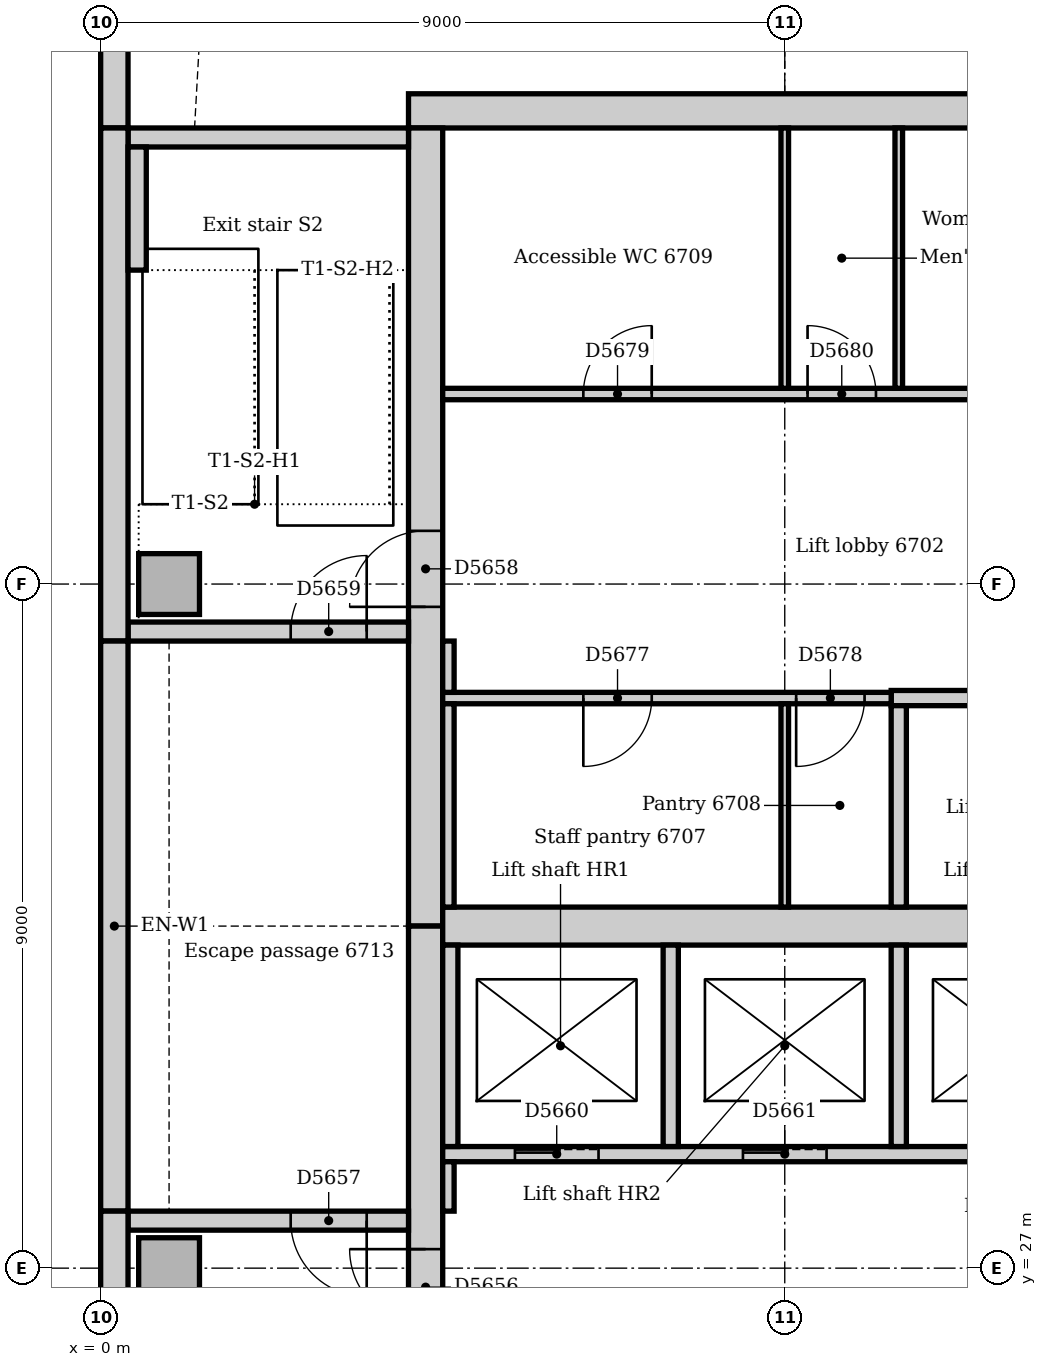
"""IFC4 building model, lengths in metres.
Left out: names, types, materials, properties, quantities, classifications, styles, units other than length and angle.
Written with IfcOpenShell. Run it as: python <this file> out.ifc"""

import sys

from ifc_helpers import new_model, si_unit, direction, frame, frame_2d, origin, origin_2d, place, context, subcontext, project, spatial, rectangle, extrude, element, fill, save


model = new_model("IFC4")
c1 = context("Model", 3, precision=1e-05, world=origin(), true_north=direction((0.0, 1.0)))
c2 = subcontext(c1, "Body", "Model", "MODEL_VIEW")
j1 = project(units=[si_unit("LENGTHUNIT", "METRE"), si_unit("PLANEANGLEUNIT", "RADIAN")], contexts=[c1])
p1 = place(None, origin())
s1 = spatial("IfcSite", under=j1, at=p1, CompositionType="ELEMENT")
p2 = place(p1, origin())
s2 = spatial("IfcBuilding", under=s1, at=p2, CompositionType="ELEMENT")
p3 = place(p2, frame((0.0, 0.0, 279.0)))
s3 = spatial("IfcBuildingStorey", under=s2, at=p3, CompositionType="ELEMENT", Elevation=279.0)
p4 = place(p3, frame((22.95, 42.225, 0.0), z_axis=(0.0, 0.0, 1.0), x_axis=(-1.0, 0.0, 0.0)))
e1 = element("IfcWall", 1, at=p4, inside=s3, PredefinedType="SOLIDWALL", context=c2, shape_type="SweptSolid", body=[
    extrude(rectangle(XDim=18.9, YDim=0.45, at=frame_2d((9.45, 0.0))), origin(), (0.0, 0.0, 1.0), 4.0),
])
p5 = place(p3, frame((4.275, 42.0, 0.0), z_axis=(0.0, 0.0, 1.0), x_axis=(0.0, -1.0, 0.0)))
e2 = element("IfcWall", 2, at=p5, inside=s3, PredefinedType="SOLIDWALL", context=c2, shape_type="SweptSolid", body=[
    extrude(rectangle(XDim=10.5, YDim=0.45, at=frame_2d((5.25, 0.0))), origin(), (0.0, 0.0, 1.0), 4.0),
])
p6 = place(p5, frame((5.3, 0.0, 0.0)))
e3 = element("IfcOpeningElement", 3, at=p6, cuts=e2, PredefinedType="OPENING", context=c2, shape_type="SweptSolid", body=[
    extrude(rectangle(XDim=1.0, YDim=2.1, at=frame_2d((0.5, 1.05))), frame((0.0, 0.235, 0.0), z_axis=(0.0, -1.0, 0.0), x_axis=(1.0, 0.0, 0.0)), (0.0, 0.0, 1.0), 0.47),
])
p7 = place(p3, frame((4.275, 31.5, 0.0), z_axis=(0.0, 0.0, 1.0), x_axis=(0.0, -1.0, 0.0)))
e4 = element("IfcWall", 4, at=p7, inside=s3, PredefinedType="SOLIDWALL", context=c2, shape_type="SweptSolid", body=[
    extrude(rectangle(XDim=10.5, YDim=0.45, at=frame_2d((5.25, 0.0))), origin(), (0.0, 0.0, 1.0), 4.0),
])
p8 = place(p7, frame((4.25, 0.0, 0.0)))
e5 = element("IfcOpeningElement", 5, at=p8, cuts=e4, PredefinedType="OPENING", context=c2, shape_type="SweptSolid", body=[
    extrude(rectangle(XDim=1.0, YDim=2.1, at=frame_2d((0.5, 1.05))), frame((0.0, 0.235, 0.0), z_axis=(0.0, -1.0, 0.0), x_axis=(1.0, 0.0, 0.0)), (0.0, 0.0, 1.0), 0.47),
])
p9 = place(p3, frame((4.5, 31.5, 0.0), z_axis=(0.0, 0.0, 1.0), x_axis=(1.0, 0.0, 0.0)))
e6 = element("IfcWall", 6, at=p9, inside=s3, PredefinedType="SOLIDWALL", context=c2, shape_type="SweptSolid", body=[
    extrude(rectangle(XDim=18.0, YDim=0.5, at=frame_2d((9.0, 0.0))), origin(), (0.0, 0.0, 1.0), 4.0),
])
p10 = place(p3, frame((4.05, 27.625, 0.0), z_axis=(0.0, 0.0, 1.0), x_axis=(-1.0, 0.0, 0.0)))
e7 = element("IfcWall", 7, at=p10, inside=s3, PredefinedType="SOLIDWALL", context=c2, shape_type="SweptSolid", body=[
    extrude(rectangle(XDim=3.69, YDim=0.25, at=frame_2d((1.845, 0.0))), origin(), (0.0, 0.0, 1.0), 4.0),
])
p11 = place(p10, frame((0.55, 0.0, 0.0)))
e8 = element("IfcOpeningElement", 8, at=p11, cuts=e7, PredefinedType="OPENING", context=c2, shape_type="SweptSolid", body=[
    extrude(rectangle(XDim=1.0, YDim=2.1, at=frame_2d((0.5, 1.05))), frame((0.0, 0.135, 0.0), z_axis=(0.0, -1.0, 0.0), x_axis=(1.0, 0.0, 0.0)), (0.0, 0.0, 1.0), 0.27),
])
p12 = place(p3, frame((0.36, 35.375, 0.0), z_axis=(0.0, 0.0, 1.0), x_axis=(1.0, 0.0, 0.0)))
e9 = element("IfcWall", 9, at=p12, inside=s3, PredefinedType="SOLIDWALL", context=c2, shape_type="SweptSolid", body=[
    extrude(rectangle(XDim=3.69, YDim=0.25, at=frame_2d((1.845, 0.0))), origin(), (0.0, 0.0, 1.0), 4.0),
])
p13 = place(p12, frame((2.14, 0.0, 0.0)))
e10 = element("IfcOpeningElement", 10, at=p13, cuts=e9, PredefinedType="OPENING", context=c2, shape_type="SweptSolid", body=[
    extrude(rectangle(XDim=1.0, YDim=2.1, at=frame_2d((0.5, 1.05))), frame((0.0, 0.135, 0.0), z_axis=(0.0, -1.0, 0.0), x_axis=(1.0, 0.0, 0.0)), (0.0, 0.0, 1.0), 0.27),
])
p14 = place(p3, frame((4.05, 41.875, 0.0), z_axis=(0.0, 0.0, 1.0), x_axis=(-1.0, 0.0, 0.0)))
e11 = element("IfcWall", 11, at=p14, inside=s3, PredefinedType="SOLIDWALL", context=c2, shape_type="SweptSolid", body=[
    extrude(rectangle(XDim=3.69, YDim=0.25, at=frame_2d((1.845, 0.0))), origin(), (0.0, 0.0, 1.0), 4.0),
])
for number, where, z_axis, x_axis in (
    (12, (0.9, 27.0, 0.0), (0.0, 0.0, 1.0), (1.0, 0.0, 0.0)),
    (13, (0.9, 36.0, 0.0), (0.0, 0.0, 1.0), (1.0, 0.0, 0.0)),
):
    element("IfcColumn", number, at=place(p3, frame(where, z_axis=z_axis, x_axis=x_axis)), inside=s3, PredefinedType="COLUMN", context=c2, shape_type="SweptSolid", body=[
        extrude(rectangle(XDim=0.8, YDim=0.8, at=origin_2d()), origin(), (0.0, 0.0, 1.0), 4.0),
    ])
p15 = place(p3, frame((0.18, 58.757, 0.0), z_axis=(0.0, 0.0, 1.0), x_axis=(0.0, -1.0, 0.0)))
e14 = element("IfcWall", 14, at=p15, inside=s3, PredefinedType="STANDARD", context=c2, shape_type="SweptSolid", body=[
    extrude(rectangle(XDim=16.757, YDim=0.36, at=frame_2d((8.379, 0.0))), origin(), (0.0, 0.0, 1.0), 3.8),
])
p16 = place(p15, frame((3.107, 0.0, 0.9)))
e15 = element("IfcOpeningElement", 15, at=p16, cuts=e14, PredefinedType="OPENING", context=c2, shape_type="SweptSolid", body=[
    extrude(rectangle(XDim=3.3, YDim=1.6, at=frame_2d((1.65, 0.8))), frame((0.0, 0.19, 0.0), z_axis=(0.0, -1.0, 0.0), x_axis=(1.0, 0.0, 0.0)), (0.0, 0.0, 1.0), 0.38),
])
p17 = place(p15, frame((7.607, 0.0, 0.9)))
e16 = element("IfcOpeningElement", 16, at=p17, cuts=e14, PredefinedType="OPENING", context=c2, shape_type="SweptSolid", body=[
    extrude(rectangle(XDim=3.3, YDim=1.6, at=frame_2d((1.65, 0.8))), frame((0.0, 0.19, 0.0), z_axis=(0.0, -1.0, 0.0), x_axis=(1.0, 0.0, 0.0)), (0.0, 0.0, 1.0), 0.38),
])
p18 = place(p15, frame((12.107, 0.0, 0.9)))
e17 = element("IfcOpeningElement", 17, at=p18, cuts=e14, PredefinedType="OPENING", context=c2, shape_type="SweptSolid", body=[
    extrude(rectangle(XDim=3.3, YDim=1.6, at=frame_2d((1.65, 0.8))), frame((0.0, 0.19, 0.0), z_axis=(0.0, -1.0, 0.0), x_axis=(1.0, 0.0, 0.0)), (0.0, 0.0, 1.0), 0.38),
])
p19 = place(p3, frame((0.18, 42.0, 0.0), z_axis=(0.0, 0.0, 1.0), x_axis=(0.0, -1.0, 0.0)))
e18 = element("IfcWall", 18, at=p19, inside=s3, PredefinedType="STANDARD", context=c2, shape_type="SweptSolid", body=[
    extrude(rectangle(XDim=6.75, YDim=0.36, at=frame_2d((3.375, 0.0))), origin(), (0.0, 0.0, 1.0), 3.8),
])
p20 = place(p3, frame((0.18, 35.25, 0.0), z_axis=(0.0, 0.0, 1.0), x_axis=(0.0, -1.0, 0.0)))
e19 = element("IfcWall", 19, at=p20, inside=s3, PredefinedType="STANDARD", context=c2, shape_type="SweptSolid", body=[
    extrude(rectangle(XDim=7.5, YDim=0.36, at=frame_2d((3.75, 0.0))), origin(), (0.0, 0.0, 1.0), 3.8),
])
p21 = place(p3, frame((0.18, 27.75, 0.0), z_axis=(0.0, 0.0, 1.0), x_axis=(0.0, -1.0, 0.0)))
e20 = element("IfcWall", 20, at=p21, inside=s3, PredefinedType="STANDARD", context=c2, shape_type="SweptSolid", body=[
    extrude(rectangle(XDim=5.507, YDim=0.36, at=frame_2d((2.754, 0.0))), origin(), (0.0, 0.0, 1.0), 3.8),
])
p22 = place(p3, frame((0.48, 40.13, 0.0), z_axis=(0.0, 0.0, 1.0), x_axis=(0.0, 1.0, 0.0)))
e21 = element("IfcWall", 21, at=p22, inside=s3, PredefinedType="STANDARD", context=c2, shape_type="SweptSolid", body=[
    extrude(rectangle(XDim=1.62, YDim=0.24, at=frame_2d((0.81, 0.0))), origin(), (0.0, 0.0, 1.0), 4.0),
])
p23 = place(p3, frame((4.5, 28.5, 0.0), z_axis=(0.0, 0.0, 1.0), x_axis=(1.0, 0.0, 0.0)))
e22 = element("IfcWall", 22, at=p23, inside=s3, PredefinedType="PARTITIONING", context=c2, shape_type="SweptSolid", body=[
    extrude(rectangle(XDim=18.0, YDim=0.2, at=frame_2d((9.0, 0.0))), origin(), (0.0, 0.0, 1.0), 3.8),
])
p24 = place(p23, frame((0.95, 0.0, 0.0)))
e23 = element("IfcOpeningElement", 23, at=p24, cuts=e22, PredefinedType="OPENING", context=c2, shape_type="SweptSolid", body=[
    extrude(rectangle(XDim=1.1, YDim=2.1, at=frame_2d((0.55, 1.05))), frame((0.0, 0.11, 0.0), z_axis=(0.0, -1.0, 0.0), x_axis=(1.0, 0.0, 0.0)), (0.0, 0.0, 1.0), 0.22),
])
p25 = place(p23, frame((3.95, 0.0, 0.0)))
e24 = element("IfcOpeningElement", 24, at=p25, cuts=e22, PredefinedType="OPENING", context=c2, shape_type="SweptSolid", body=[
    extrude(rectangle(XDim=1.1, YDim=2.1, at=frame_2d((0.55, 1.05))), frame((0.0, 0.11, 0.0), z_axis=(0.0, -1.0, 0.0), x_axis=(1.0, 0.0, 0.0)), (0.0, 0.0, 1.0), 0.22),
])
p26 = place(p23, frame((6.95, 0.0, 0.0)))
e25 = element("IfcOpeningElement", 25, at=p26, cuts=e22, PredefinedType="OPENING", context=c2, shape_type="SweptSolid", body=[
    extrude(rectangle(XDim=1.1, YDim=2.1, at=frame_2d((0.55, 1.05))), frame((0.0, 0.11, 0.0), z_axis=(0.0, -1.0, 0.0), x_axis=(1.0, 0.0, 0.0)), (0.0, 0.0, 1.0), 0.22),
])
p27 = place(p23, frame((9.95, 0.0, 0.0)))
e26 = element("IfcOpeningElement", 26, at=p27, cuts=e22, PredefinedType="OPENING", context=c2, shape_type="SweptSolid", body=[
    extrude(rectangle(XDim=1.1, YDim=2.1, at=frame_2d((0.55, 1.05))), frame((0.0, 0.11, 0.0), z_axis=(0.0, -1.0, 0.0), x_axis=(1.0, 0.0, 0.0)), (0.0, 0.0, 1.0), 0.22),
])
p28 = place(p23, frame((12.95, 0.0, 0.0)))
e27 = element("IfcOpeningElement", 27, at=p28, cuts=e22, PredefinedType="OPENING", context=c2, shape_type="SweptSolid", body=[
    extrude(rectangle(XDim=1.1, YDim=2.1, at=frame_2d((0.55, 1.05))), frame((0.0, 0.11, 0.0), z_axis=(0.0, -1.0, 0.0), x_axis=(1.0, 0.0, 0.0)), (0.0, 0.0, 1.0), 0.22),
])
p29 = place(p23, frame((15.95, 0.0, 0.0)))
e28 = element("IfcOpeningElement", 28, at=p29, cuts=e22, PredefinedType="OPENING", context=c2, shape_type="SweptSolid", body=[
    extrude(rectangle(XDim=1.1, YDim=2.1, at=frame_2d((0.55, 1.05))), frame((0.0, 0.11, 0.0), z_axis=(0.0, -1.0, 0.0), x_axis=(1.0, 0.0, 0.0)), (0.0, 0.0, 1.0), 0.22),
])
p30 = place(p3, frame((10.4, 34.5, 0.0), z_axis=(0.0, 0.0, 1.0), x_axis=(1.0, 0.0, 0.0)))
e29 = element("IfcWall", 29, at=p30, inside=s3, PredefinedType="PARTITIONING", context=c2, shape_type="SweptSolid", body=[
    extrude(rectangle(XDim=12.1, YDim=0.2, at=frame_2d((6.05, 0.0))), origin(), (0.0, 0.0, 1.0), 3.8),
])
p31 = place(p30, frame((7.05, 0.0, 0.0)))
e30 = element("IfcOpeningElement", 30, at=p31, cuts=e29, PredefinedType="OPENING", context=c2, shape_type="SweptSolid", body=[
    extrude(rectangle(XDim=1.1, YDim=2.1, at=frame_2d((0.55, 1.05))), frame((0.0, 0.11, 0.0), z_axis=(0.0, -1.0, 0.0), x_axis=(1.0, 0.0, 0.0)), (0.0, 0.0, 1.0), 0.22),
])
p32 = place(p30, frame((10.05, 0.0, 0.0)))
e31 = element("IfcOpeningElement", 31, at=p32, cuts=e29, PredefinedType="OPENING", context=c2, shape_type="SweptSolid", body=[
    extrude(rectangle(XDim=1.1, YDim=2.1, at=frame_2d((0.55, 1.05))), frame((0.0, 0.11, 0.0), z_axis=(0.0, -1.0, 0.0), x_axis=(1.0, 0.0, 0.0)), (0.0, 0.0, 1.0), 0.22),
])
for number, where, z_axis, x_axis in (
    (32, (10.5, 28.6, 0.0), (0.0, 0.0, 1.0), (0.0, 1.0, 0.0)),
    (33, (10.5, 31.75, 0.0), (0.0, 0.0, 1.0), (0.0, 1.0, 0.0)),
    (34, (4.6, 28.6, 0.0), (0.0, 0.0, 1.0), (0.0, 1.0, 0.0)),
    (35, (7.5, 28.6, 0.0), (0.0, 0.0, 1.0), (0.0, 1.0, 0.0)),
):
    element("IfcWall", number, at=place(p3, frame(where, z_axis=z_axis, x_axis=x_axis)), inside=s3, PredefinedType="PARTITIONING", context=c2, shape_type="SweptSolid", body=[
        extrude(rectangle(XDim=2.65, YDim=0.2, at=frame_2d((1.325, 0.0))), origin(), (0.0, 0.0, 1.0), 3.8),
    ])
p33 = place(p3, frame((4.5, 38.5, 0.0), z_axis=(0.0, 0.0, 1.0), x_axis=(1.0, 0.0, 0.0)))
e36 = element("IfcWall", 36, at=p33, inside=s3, PredefinedType="PARTITIONING", context=c2, shape_type="SweptSolid", body=[
    extrude(rectangle(XDim=11.9, YDim=0.15, at=frame_2d((5.95, 0.0))), origin(), (0.0, 0.0, 1.0), 3.8),
])
p34 = place(p33, frame((1.85, 0.0, 0.0)))
e37 = element("IfcOpeningElement", 37, at=p34, cuts=e36, PredefinedType="OPENING", context=c2, shape_type="SweptSolid", body=[
    extrude(rectangle(XDim=0.9, YDim=2.1, at=frame_2d((0.45, 1.05))), frame((0.0, 0.085, 0.0), z_axis=(0.0, -1.0, 0.0), x_axis=(1.0, 0.0, 0.0)), (0.0, 0.0, 1.0), 0.17),
])
p35 = place(p33, frame((4.8, 0.0, 0.0)))
e38 = element("IfcOpeningElement", 38, at=p35, cuts=e36, PredefinedType="OPENING", context=c2, shape_type="SweptSolid", body=[
    extrude(rectangle(XDim=0.9, YDim=2.1, at=frame_2d((0.45, 1.05))), frame((0.0, 0.085, 0.0), z_axis=(0.0, -1.0, 0.0), x_axis=(1.0, 0.0, 0.0)), (0.0, 0.0, 1.0), 0.17),
])
p36 = place(p33, frame((7.05, 0.0, 0.0)))
e39 = element("IfcOpeningElement", 39, at=p36, cuts=e36, PredefinedType="OPENING", context=c2, shape_type="SweptSolid", body=[
    extrude(rectangle(XDim=0.9, YDim=2.1, at=frame_2d((0.45, 1.05))), frame((0.0, 0.085, 0.0), z_axis=(0.0, -1.0, 0.0), x_axis=(1.0, 0.0, 0.0)), (0.0, 0.0, 1.0), 0.17),
])
p37 = place(p33, frame((9.95, 0.0, 0.0)))
e40 = element("IfcOpeningElement", 40, at=p37, cuts=e36, PredefinedType="OPENING", context=c2, shape_type="SweptSolid", body=[
    extrude(rectangle(XDim=0.8, YDim=2.1, at=frame_2d((0.4, 1.05))), frame((0.0, 0.085, 0.0), z_axis=(0.0, -1.0, 0.0), x_axis=(1.0, 0.0, 0.0)), (0.0, 0.0, 1.0), 0.17),
])
p38 = place(p3, frame((4.5, 34.5, 0.0), z_axis=(0.0, 0.0, 1.0), x_axis=(1.0, 0.0, 0.0)))
e41 = element("IfcWall", 41, at=p38, inside=s3, PredefinedType="PARTITIONING", context=c2, shape_type="SweptSolid", body=[
    extrude(rectangle(XDim=5.9, YDim=0.15, at=frame_2d((2.95, 0.0))), origin(), (0.0, 0.0, 1.0), 3.8),
])
p39 = place(p38, frame((1.85, 0.0, 0.0)))
e42 = element("IfcOpeningElement", 42, at=p39, cuts=e41, PredefinedType="OPENING", context=c2, shape_type="SweptSolid", body=[
    extrude(rectangle(XDim=0.9, YDim=2.1, at=frame_2d((0.45, 1.05))), frame((0.0, 0.085, 0.0), z_axis=(0.0, -1.0, 0.0), x_axis=(1.0, 0.0, 0.0)), (0.0, 0.0, 1.0), 0.17),
])
p40 = place(p38, frame((4.65, 0.0, 0.0)))
e43 = element("IfcOpeningElement", 43, at=p40, cuts=e41, PredefinedType="OPENING", context=c2, shape_type="SweptSolid", body=[
    extrude(rectangle(XDim=0.9, YDim=2.1, at=frame_2d((0.45, 1.05))), frame((0.0, 0.085, 0.0), z_axis=(0.0, -1.0, 0.0), x_axis=(1.0, 0.0, 0.0)), (0.0, 0.0, 1.0), 0.17),
])
p41 = place(p3, frame((4.575, 34.575, 0.0), z_axis=(0.0, 0.0, 1.0), x_axis=(0.0, 1.0, 0.0)))
e44 = element("IfcWall", 44, at=p41, inside=s3, PredefinedType="PARTITIONING", context=c2, shape_type="SweptSolid", body=[
    extrude(rectangle(XDim=0.675, YDim=0.15, at=frame_2d((0.338, 0.0))), origin(), (0.0, 0.0, 1.0), 3.8),
])
p42 = place(p3, frame((4.575, 31.75, 0.0), z_axis=(0.0, 0.0, 1.0), x_axis=(0.0, 1.0, 0.0)))
e45 = element("IfcWall", 45, at=p42, inside=s3, PredefinedType="PARTITIONING", context=c2, shape_type="SweptSolid", body=[
    extrude(rectangle(XDim=2.675, YDim=0.15, at=frame_2d((1.337, 0.0))), origin(), (0.0, 0.0, 1.0), 3.8),
])
p43 = place(p3, frame((4.575, 27.75, 0.0), z_axis=(0.0, 0.0, 1.0), x_axis=(0.0, 1.0, 0.0)))
e46 = element("IfcWall", 46, at=p43, inside=s3, PredefinedType="PARTITIONING", context=c2, shape_type="SweptSolid", body=[
    extrude(rectangle(XDim=0.65, YDim=0.15, at=frame_2d((0.325, 0.0))), origin(), (0.0, 0.0, 1.0), 3.8),
])
for number, where, z_axis, x_axis in (
    (47, (9.0, 38.575, 0.0), (0.0, 0.0, 1.0), (0.0, 1.0, 0.0)),
    (48, (10.5, 38.575, 0.0), (0.0, 0.0, 1.0), (0.0, 1.0, 0.0)),
):
    element("IfcWall", number, at=place(p3, frame(where, z_axis=z_axis, x_axis=x_axis)), inside=s3, PredefinedType="PARTITIONING", context=c2, shape_type="SweptSolid", body=[
        extrude(rectangle(XDim=3.425, YDim=0.1, at=frame_2d((1.712, 0.0))), origin(), (0.0, 0.0, 1.0), 3.8),
    ])
p44 = place(p3, frame((9.0, 31.75, 0.0), z_axis=(0.0, 0.0, 1.0), x_axis=(0.0, 1.0, 0.0)))
e49 = element("IfcWall", 49, at=p44, inside=s3, PredefinedType="PARTITIONING", context=c2, shape_type="SweptSolid", body=[
    extrude(rectangle(XDim=2.675, YDim=0.1, at=frame_2d((1.337, 0.0))), origin(), (0.0, 0.0, 1.0), 3.8),
])
p45 = place(p8, frame((1.0, 0.0, 0.0), z_axis=(0.0, 0.0, 1.0), x_axis=(-1.0, 0.0, 0.0)))
e50 = element("IfcDoor", 50, at=p45, inside=s3, OperationType="SINGLE_SWING_RIGHT", PredefinedType="DOOR", context=c2, shape_type="SweptSolid", body=[
    extrude(rectangle(XDim=1.0, YDim=2.1, at=frame_2d((0.5, 1.05))), frame((0.0, 0.025, 0.0), z_axis=(0.0, -1.0, 0.0), x_axis=(1.0, 0.0, 0.0)), (0.0, 0.0, 1.0), 0.05),
])
fill(e5, e50)
p46 = place(p11, origin())
e51 = element("IfcDoor", 51, at=p46, inside=s3, OperationType="SINGLE_SWING_LEFT", PredefinedType="DOOR", context=c2, shape_type="SweptSolid", body=[
    extrude(rectangle(XDim=1.0, YDim=2.1, at=frame_2d((0.5, 1.05))), frame((0.0, 0.025, 0.0), z_axis=(0.0, -1.0, 0.0), x_axis=(1.0, 0.0, 0.0)), (0.0, 0.0, 1.0), 0.05),
])
fill(e8, e51)
p47 = place(p6, frame((1.0, 0.0, 0.0), z_axis=(0.0, 0.0, 1.0), x_axis=(-1.0, 0.0, 0.0)))
e52 = element("IfcDoor", 52, at=p47, inside=s3, OperationType="SINGLE_SWING_LEFT", PredefinedType="DOOR", context=c2, shape_type="SweptSolid", body=[
    extrude(rectangle(XDim=1.0, YDim=2.1, at=frame_2d((0.5, 1.05))), frame((0.0, 0.025, 0.0), z_axis=(0.0, -1.0, 0.0), x_axis=(1.0, 0.0, 0.0)), (0.0, 0.0, 1.0), 0.05),
])
fill(e3, e52)
p48 = place(p13, origin())
e53 = element("IfcDoor", 53, at=p48, inside=s3, OperationType="SINGLE_SWING_RIGHT", PredefinedType="DOOR", context=c2, shape_type="SweptSolid", body=[
    extrude(rectangle(XDim=1.0, YDim=2.1, at=frame_2d((0.5, 1.05))), frame((0.0, 0.025, 0.0), z_axis=(0.0, -1.0, 0.0), x_axis=(1.0, 0.0, 0.0)), (0.0, 0.0, 1.0), 0.05),
])
fill(e10, e53)
p49 = place(p24, origin())
e54 = element("IfcDoor", 54, at=p49, inside=s3, OperationType="SLIDING_TO_LEFT", PredefinedType="DOOR", context=c2, shape_type="SweptSolid", body=[
    extrude(rectangle(XDim=1.1, YDim=2.1, at=frame_2d((0.55, 1.05))), frame((0.0, 0.025, 0.0), z_axis=(0.0, -1.0, 0.0), x_axis=(1.0, 0.0, 0.0)), (0.0, 0.0, 1.0), 0.05),
])
fill(e23, e54)
p50 = place(p25, origin())
e55 = element("IfcDoor", 55, at=p50, inside=s3, OperationType="SLIDING_TO_LEFT", PredefinedType="DOOR", context=c2, shape_type="SweptSolid", body=[
    extrude(rectangle(XDim=1.1, YDim=2.1, at=frame_2d((0.55, 1.05))), frame((0.0, 0.025, 0.0), z_axis=(0.0, -1.0, 0.0), x_axis=(1.0, 0.0, 0.0)), (0.0, 0.0, 1.0), 0.05),
])
fill(e24, e55)
p51 = place(p39, frame((0.9, 0.0, 0.0), z_axis=(0.0, 0.0, 1.0), x_axis=(-1.0, 0.0, 0.0)))
e56 = element("IfcDoor", 56, at=p51, inside=s3, OperationType="SINGLE_SWING_RIGHT", PredefinedType="DOOR", context=c2, shape_type="SweptSolid", body=[
    extrude(rectangle(XDim=0.9, YDim=2.1, at=frame_2d((0.45, 1.05))), frame((0.0, 0.025, 0.0), z_axis=(0.0, -1.0, 0.0), x_axis=(1.0, 0.0, 0.0)), (0.0, 0.0, 1.0), 0.05),
])
fill(e42, e56)
p52 = place(p40, frame((0.9, 0.0, 0.0), z_axis=(0.0, 0.0, 1.0), x_axis=(-1.0, 0.0, 0.0)))
e57 = element("IfcDoor", 57, at=p52, inside=s3, OperationType="SINGLE_SWING_RIGHT", PredefinedType="DOOR", context=c2, shape_type="SweptSolid", body=[
    extrude(rectangle(XDim=0.9, YDim=2.1, at=frame_2d((0.45, 1.05))), frame((0.0, 0.025, 0.0), z_axis=(0.0, -1.0, 0.0), x_axis=(1.0, 0.0, 0.0)), (0.0, 0.0, 1.0), 0.05),
])
fill(e43, e57)
p53 = place(p34, origin())
e58 = element("IfcDoor", 58, at=p53, inside=s3, OperationType="SINGLE_SWING_RIGHT", PredefinedType="DOOR", context=c2, shape_type="SweptSolid", body=[
    extrude(rectangle(XDim=0.9, YDim=2.1, at=frame_2d((0.45, 1.05))), frame((0.0, 0.025, 0.0), z_axis=(0.0, -1.0, 0.0), x_axis=(1.0, 0.0, 0.0)), (0.0, 0.0, 1.0), 0.05),
])
fill(e37, e58)
p54 = place(p35, origin())
e59 = element("IfcDoor", 59, at=p54, inside=s3, OperationType="SINGLE_SWING_LEFT", PredefinedType="DOOR", context=c2, shape_type="SweptSolid", body=[
    extrude(rectangle(XDim=0.9, YDim=2.1, at=frame_2d((0.45, 1.05))), frame((0.0, 0.025, 0.0), z_axis=(0.0, -1.0, 0.0), x_axis=(1.0, 0.0, 0.0)), (0.0, 0.0, 1.0), 0.05),
])
fill(e38, e59)
save(model, sys.argv[1])
